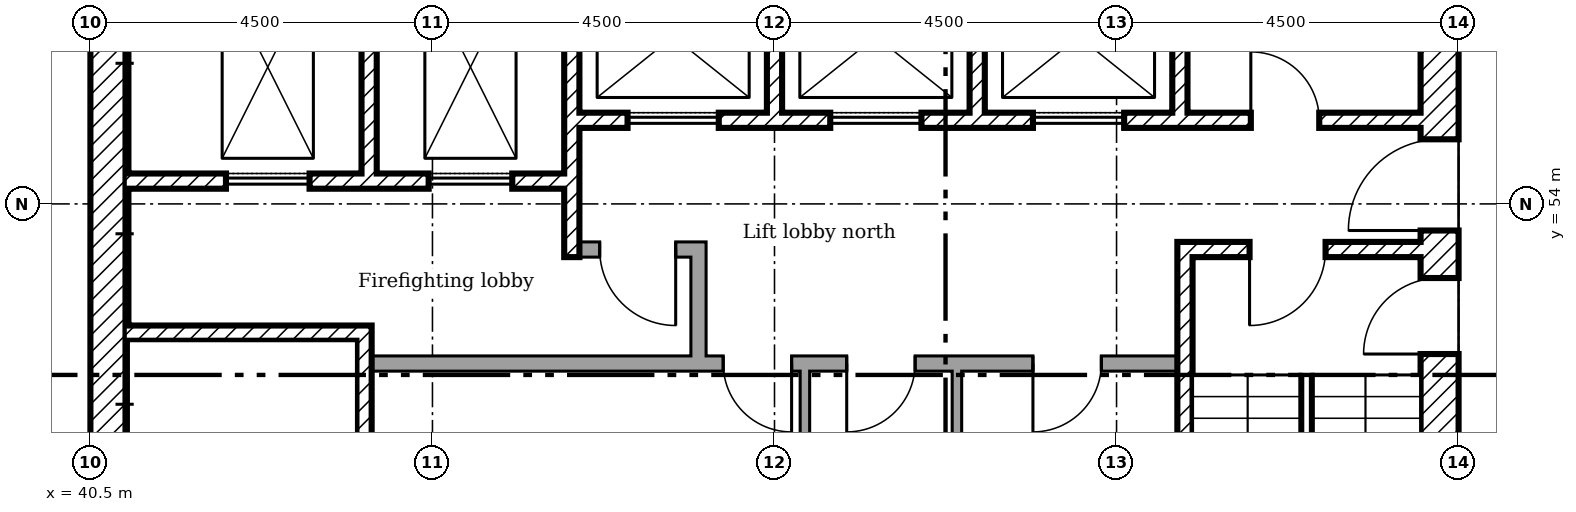
"""IFC4 building model, lengths in metres.
Left out: names, types, materials, properties, quantities, classifications, styles, units other than length and angle.
Written with IfcOpenShell. Run it as: python <this file> out.ifc"""

import sys

from ifc_helpers import new_model, si_unit, direction, frame, frame_2d, origin, place, context, subcontext, project, spatial, rectangle, extrude, element, fill, save


model = new_model("IFC4")
c1 = context("Model", 3, precision=1e-05, world=origin(), true_north=direction((0.0, 1.0)))
c2 = subcontext(c1, "Body", "Model", "MODEL_VIEW")
j1 = project(units=[si_unit("LENGTHUNIT", "METRE"), si_unit("PLANEANGLEUNIT", "RADIAN")], contexts=[c1])
p1 = place(None, origin())
s1 = spatial("IfcSite", under=j1, at=p1, CompositionType="ELEMENT")
p2 = place(p1, origin())
s2 = spatial("IfcBuilding", under=s1, at=p2, CompositionType="ELEMENT")
p3 = place(p2, frame((0.0, 0.0, 238.8)))
s3 = spatial("IfcBuildingStorey", under=s2, at=p3, CompositionType="ELEMENT", Elevation=238.8)
p4 = place(p3, frame((58.25, 40.5, 0.0), z_axis=(0.0, 0.0, 1.0), x_axis=(0.0, 1.0, 0.0)))
e1 = element("IfcWall", 1, at=p4, inside=s3, PredefinedType="SHEAR", context=c2, shape_type="SweptSolid", body=[
    extrude(rectangle(XDim=18.0, YDim=0.5, at=frame_2d((9.0, 0.0))), origin(), (0.0, 0.0, 1.0), 3.35),
])
p5 = place(p4, frame((13.15, 0.0, 0.0)))
e2 = element("IfcOpeningElement", 2, at=p5, cuts=e1, PredefinedType="OPENING", context=c2, shape_type="SweptSolid", body=[
    extrude(rectangle(XDim=1.2, YDim=2.1, at=frame_2d((0.6, 1.05))), frame((0.0, 0.26, 0.0), z_axis=(0.0, -1.0, 0.0), x_axis=(1.0, 0.0, 0.0)), (0.0, 0.0, 1.0), 0.52),
])
p6 = place(p4, frame((3.9, 0.0, 0.0)))
e3 = element("IfcOpeningElement", 3, at=p6, cuts=e1, PredefinedType="OPENING", context=c2, shape_type="SweptSolid", body=[
    extrude(rectangle(XDim=1.8, YDim=2.1, at=frame_2d((0.9, 1.05))), frame((0.0, 0.26, 0.0), z_axis=(0.0, -1.0, 0.0), x_axis=(1.0, 0.0, 0.0)), (0.0, 0.0, 1.0), 0.52),
])
p7 = place(p4, frame((11.525, 0.0, 0.0)))
e4 = element("IfcOpeningElement", 4, at=p7, cuts=e1, PredefinedType="OPENING", context=c2, shape_type="SweptSolid", body=[
    extrude(rectangle(XDim=1.0, YDim=2.1, at=frame_2d((0.5, 1.05))), frame((0.0, 0.26, 0.0), z_axis=(0.0, -1.0, 0.0), x_axis=(1.0, 0.0, 0.0)), (0.0, 0.0, 1.0), 0.52),
])
p8 = place(p3, frame((40.75, 41.0, 0.0), z_axis=(0.0, 0.0, 1.0), x_axis=(0.0, 1.0, 0.0)))
e5 = element("IfcWall", 5, at=p8, inside=s3, PredefinedType="SHEAR", context=c2, shape_type="SweptSolid", body=[
    extrude(rectangle(XDim=17.0, YDim=0.5, at=frame_2d((8.5, 0.0))), origin(), (0.0, 0.0, 1.0), 3.35),
])
p9 = place(p3, frame((44.167, 58.0, 0.0), z_axis=(0.0, 0.0, 1.0), x_axis=(0.0, -1.0, 0.0)))
e6 = element("IfcWall", 6, at=p9, inside=s3, PredefinedType="SHEAR", context=c2, shape_type="SweptSolid", body=[
    extrude(rectangle(XDim=3.6, YDim=0.2, at=frame_2d((1.8, 0.0))), origin(), (0.0, 0.0, 1.0), 3.35),
])
p10 = place(p3, frame((46.833, 58.0, 0.0), z_axis=(0.0, 0.0, 1.0), x_axis=(0.0, -1.0, 0.0)))
e7 = element("IfcWall", 7, at=p10, inside=s3, PredefinedType="SHEAR", context=c2, shape_type="SweptSolid", body=[
    extrude(rectangle(XDim=4.7, YDim=0.2, at=frame_2d((2.35, 0.0))), origin(), (0.0, 0.0, 1.0), 3.35),
])
for number, where, z_axis, x_axis in (
    (8, (49.5, 58.0, 0.0), (0.0, 0.0, 1.0), (0.0, -1.0, 0.0)),
    (9, (52.167, 58.0, 0.0), (0.0, 0.0, 1.0), (0.0, -1.0, 0.0)),
    (10, (54.833, 58.0, 0.0), (0.0, 0.0, 1.0), (0.0, -1.0, 0.0)),
):
    element("IfcWall", number, at=place(p3, frame(where, z_axis=z_axis, x_axis=x_axis)), inside=s3, PredefinedType="SHEAR", context=c2, shape_type="SweptSolid", body=[
        extrude(rectangle(XDim=2.8, YDim=0.2, at=frame_2d((1.4, 0.0))), origin(), (0.0, 0.0, 1.0), 3.35),
    ])
p11 = place(p3, frame((48.5, 51.9, 0.0), z_axis=(0.0, 0.0, 1.0), x_axis=(0.0, 1.0, 0.0)))
e11 = element("IfcWall", 11, at=p11, inside=s3, PredefinedType="PARTITIONING", context=c2, shape_type="SweptSolid", body=[
    extrude(rectangle(XDim=1.6, YDim=0.2, at=frame_2d((0.8, 0.0))), origin(), (0.0, 0.0, 1.0), 3.35),
])
p12 = place(p3, frame((46.933, 53.4, 0.0)))
e12 = element("IfcWall", 12, at=p12, inside=s3, PredefinedType="PARTITIONING", context=c2, shape_type="SweptSolid", body=[
    extrude(rectangle(XDim=1.467, YDim=0.2, at=frame_2d((0.733, 0.0))), origin(), (0.0, 0.0, 1.0), 3.35),
])
p13 = place(p12, frame((0.267, 0.0, 0.0)))
e13 = element("IfcOpeningElement", 13, at=p13, cuts=e12, PredefinedType="OPENING", context=c2, shape_type="SweptSolid", body=[
    extrude(rectangle(XDim=1.0, YDim=2.1, at=frame_2d((0.5, 1.05))), frame((0.0, 0.11, 0.0), z_axis=(0.0, -1.0, 0.0), x_axis=(1.0, 0.0, 0.0)), (0.0, 0.0, 1.0), 0.22),
])
p14 = place(p3, frame((46.933, 55.1, 0.0)))
e14 = element("IfcWall", 14, at=p14, inside=s3, PredefinedType="SHEAR", context=c2, shape_type="SweptSolid", body=[
    extrude(rectangle(XDim=11.067, YDim=0.2, at=frame_2d((5.533, 0.0))), origin(), (0.0, 0.0, 1.0), 3.35),
])
p15 = place(p14, frame((8.833, 0.0, 0.0)))
e15 = element("IfcOpeningElement", 15, at=p15, cuts=e14, PredefinedType="OPENING", context=c2, shape_type="SweptSolid", body=[
    extrude(rectangle(XDim=0.9, YDim=2.1, at=frame_2d((0.45, 1.05))), frame((0.0, 0.11, 0.0), z_axis=(0.0, -1.0, 0.0), x_axis=(1.0, 0.0, 0.0)), (0.0, 0.0, 1.0), 0.22),
])
p16 = place(p14, frame((0.633, 0.0, 0.0)))
e16 = element("IfcOpeningElement", 16, at=p16, cuts=e14, PredefinedType="OPENING", context=c2, shape_type="SweptSolid", body=[
    extrude(rectangle(XDim=1.2, YDim=2.1, at=frame_2d((0.6, 1.05))), frame((0.0, 0.11, 0.0), z_axis=(0.0, -1.0, 0.0), x_axis=(1.0, 0.0, 0.0)), (0.0, 0.0, 1.0), 0.22),
])
p17 = place(p14, frame((3.3, 0.0, 0.0)))
e17 = element("IfcOpeningElement", 17, at=p17, cuts=e14, PredefinedType="OPENING", context=c2, shape_type="SweptSolid", body=[
    extrude(rectangle(XDim=1.2, YDim=2.1, at=frame_2d((0.6, 1.05))), frame((0.0, 0.11, 0.0), z_axis=(0.0, -1.0, 0.0), x_axis=(1.0, 0.0, 0.0)), (0.0, 0.0, 1.0), 0.22),
])
p18 = place(p14, frame((5.967, 0.0, 0.0)))
e18 = element("IfcOpeningElement", 18, at=p18, cuts=e14, PredefinedType="OPENING", context=c2, shape_type="SweptSolid", body=[
    extrude(rectangle(XDim=1.2, YDim=2.1, at=frame_2d((0.6, 1.05))), frame((0.0, 0.11, 0.0), z_axis=(0.0, -1.0, 0.0), x_axis=(1.0, 0.0, 0.0)), (0.0, 0.0, 1.0), 0.22),
])
p19 = place(p3, frame((41.0, 54.3, 0.0)))
e19 = element("IfcWall", 19, at=p19, inside=s3, PredefinedType="SHEAR", context=c2, shape_type="SweptSolid", body=[
    extrude(rectangle(XDim=5.733, YDim=0.2, at=frame_2d((2.867, 0.0))), origin(), (0.0, 0.0, 1.0), 3.35),
])
p20 = place(p19, frame((1.283, 0.0, 0.0)))
e20 = element("IfcOpeningElement", 20, at=p20, cuts=e19, PredefinedType="OPENING", context=c2, shape_type="SweptSolid", body=[
    extrude(rectangle(XDim=1.1, YDim=2.1, at=frame_2d((0.55, 1.05))), frame((0.0, 0.11, 0.0), z_axis=(0.0, -1.0, 0.0), x_axis=(1.0, 0.0, 0.0)), (0.0, 0.0, 1.0), 0.22),
])
p21 = place(p19, frame((3.95, 0.0, 0.0)))
e21 = element("IfcOpeningElement", 21, at=p21, cuts=e19, PredefinedType="OPENING", context=c2, shape_type="SweptSolid", body=[
    extrude(rectangle(XDim=1.1, YDim=2.1, at=frame_2d((0.55, 1.05))), frame((0.0, 0.11, 0.0), z_axis=(0.0, -1.0, 0.0), x_axis=(1.0, 0.0, 0.0)), (0.0, 0.0, 1.0), 0.22),
])
p22 = place(p3, frame((44.1, 45.5, 0.0), z_axis=(0.0, 0.0, 1.0), x_axis=(0.0, 1.0, 0.0)))
e22 = element("IfcWall", 22, at=p22, inside=s3, PredefinedType="SHEAR", context=c2, shape_type="SweptSolid", body=[
    extrude(rectangle(XDim=6.9, YDim=0.2, at=frame_2d((3.45, 0.0))), origin(), (0.0, 0.0, 1.0), 3.35),
])
p23 = place(p3, frame((41.0, 52.3, 0.0)))
e23 = element("IfcWall", 23, at=p23, inside=s3, PredefinedType="SHEAR", context=c2, shape_type="SweptSolid", body=[
    extrude(rectangle(XDim=3.0, YDim=0.2, at=frame_2d((1.5, 0.0))), origin(), (0.0, 0.0, 1.0), 3.35),
])
p24 = place(p3, frame((54.8, 53.4, 0.0)))
e24 = element("IfcWall", 24, at=p24, inside=s3, PredefinedType="SHEAR", context=c2, shape_type="SweptSolid", body=[
    extrude(rectangle(XDim=3.2, YDim=0.2, at=frame_2d((1.6, 0.0))), origin(), (0.0, 0.0, 1.0), 3.35),
])
p25 = place(p24, frame((0.95, 0.0, 0.0)))
e25 = element("IfcOpeningElement", 25, at=p25, cuts=e24, PredefinedType="OPENING", context=c2, shape_type="SweptSolid", body=[
    extrude(rectangle(XDim=1.0, YDim=2.1, at=frame_2d((0.5, 1.05))), frame((0.0, 0.11, 0.0), z_axis=(0.0, -1.0, 0.0), x_axis=(1.0, 0.0, 0.0)), (0.0, 0.0, 1.0), 0.22),
])
p26 = place(p3, frame((54.9, 46.8, 0.0), z_axis=(0.0, 0.0, 1.0), x_axis=(0.0, 1.0, 0.0)))
e26 = element("IfcWall", 26, at=p26, inside=s3, PredefinedType="SHEAR", context=c2, shape_type="SweptSolid", body=[
    extrude(rectangle(XDim=6.5, YDim=0.2, at=frame_2d((3.25, 0.0))), origin(), (0.0, 0.0, 1.0), 3.35),
])
p27 = place(p3, frame((44.2, 51.9, 0.0)))
e27 = element("IfcWall", 27, at=p27, inside=s3, PredefinedType="PARTITIONING", context=c2, shape_type="SweptSolid", body=[
    extrude(rectangle(XDim=10.6, YDim=0.2, at=frame_2d((5.3, 0.0))), origin(), (0.0, 0.0, 1.0), 3.35),
])
p28 = place(p27, frame((4.625, 0.0, 0.0)))
e28 = element("IfcOpeningElement", 28, at=p28, cuts=e27, PredefinedType="OPENING", context=c2, shape_type="SweptSolid", body=[
    extrude(rectangle(XDim=0.9, YDim=2.1, at=frame_2d((0.45, 1.05))), frame((0.0, 0.11, 0.0), z_axis=(0.0, -1.0, 0.0), x_axis=(1.0, 0.0, 0.0)), (0.0, 0.0, 1.0), 0.22),
])
p29 = place(p27, frame((6.25, 0.0, 0.0)))
e29 = element("IfcOpeningElement", 29, at=p29, cuts=e27, PredefinedType="OPENING", context=c2, shape_type="SweptSolid", body=[
    extrude(rectangle(XDim=0.9, YDim=2.1, at=frame_2d((0.45, 1.05))), frame((0.0, 0.11, 0.0), z_axis=(0.0, -1.0, 0.0), x_axis=(1.0, 0.0, 0.0)), (0.0, 0.0, 1.0), 0.22),
])
p30 = place(p27, frame((8.7, 0.0, 0.0)))
e30 = element("IfcOpeningElement", 30, at=p30, cuts=e27, PredefinedType="OPENING", context=c2, shape_type="SweptSolid", body=[
    extrude(rectangle(XDim=0.9, YDim=2.1, at=frame_2d((0.45, 1.05))), frame((0.0, 0.11, 0.0), z_axis=(0.0, -1.0, 0.0), x_axis=(1.0, 0.0, 0.0)), (0.0, 0.0, 1.0), 0.22),
])
for number, where, z_axis, x_axis in (
    (31, (49.9, 48.163, 0.0), (0.0, 0.0, 1.0), (0.0, 1.0, 0.0)),
    (32, (51.9, 48.163, 0.0), (0.0, 0.0, 1.0), (0.0, 1.0, 0.0)),
):
    element("IfcWall", number, at=place(p3, frame(where, z_axis=z_axis, x_axis=x_axis)), inside=s3, PredefinedType="PARTITIONING", context=c2, shape_type="SweptSolid", body=[
        extrude(rectangle(XDim=3.637, YDim=0.125, at=frame_2d((1.819, 0.0))), origin(), (0.0, 0.0, 1.0), 3.35),
    ])
p31 = place(p5, origin())
e33 = element("IfcDoor", 33, at=p31, inside=s3, OperationType="SINGLE_SWING_RIGHT", PredefinedType="DOOR", context=c2, shape_type="SweptSolid", body=[
    extrude(rectangle(XDim=1.2, YDim=2.1, at=frame_2d((0.6, 1.05))), frame((0.0, 0.025, 0.0), z_axis=(0.0, -1.0, 0.0), x_axis=(1.0, 0.0, 0.0)), (0.0, 0.0, 1.0), 0.05),
])
fill(e2, e33)
p32 = place(p25, frame((1.0, 0.0, 0.0), x_axis=(-1.0, 0.0, 0.0)))
e34 = element("IfcDoor", 34, at=p32, inside=s3, OperationType="SINGLE_SWING_LEFT", PredefinedType="DOOR", context=c2, shape_type="SweptSolid", body=[
    extrude(rectangle(XDim=1.0, YDim=2.1, at=frame_2d((0.5, 1.05))), frame((0.0, 0.025, 0.0), z_axis=(0.0, -1.0, 0.0), x_axis=(1.0, 0.0, 0.0)), (0.0, 0.0, 1.0), 0.05),
])
fill(e25, e34)
p33 = place(p7, origin())
e35 = element("IfcDoor", 35, at=p33, inside=s3, OperationType="SINGLE_SWING_RIGHT", PredefinedType="DOOR", context=c2, shape_type="SweptSolid", body=[
    extrude(rectangle(XDim=1.0, YDim=2.1, at=frame_2d((0.5, 1.05))), frame((0.0, 0.025, 0.0), z_axis=(0.0, -1.0, 0.0), x_axis=(1.0, 0.0, 0.0)), (0.0, 0.0, 1.0), 0.05),
])
fill(e4, e35)
p34 = place(p13, frame((1.0, 0.0, 0.0), x_axis=(-1.0, 0.0, 0.0)))
e36 = element("IfcDoor", 36, at=p34, inside=s3, OperationType="SINGLE_SWING_RIGHT", PredefinedType="DOOR", context=c2, shape_type="SweptSolid", body=[
    extrude(rectangle(XDim=1.0, YDim=2.1, at=frame_2d((0.5, 1.05))), frame((0.0, 0.025, 0.0), z_axis=(0.0, -1.0, 0.0), x_axis=(1.0, 0.0, 0.0)), (0.0, 0.0, 1.0), 0.05),
])
fill(e13, e36)
p35 = place(p15, origin())
e37 = element("IfcDoor", 37, at=p35, inside=s3, OperationType="SINGLE_SWING_RIGHT", PredefinedType="DOOR", context=c2, shape_type="SweptSolid", body=[
    extrude(rectangle(XDim=0.9, YDim=2.1, at=frame_2d((0.45, 1.05))), frame((0.0, 0.025, 0.0), z_axis=(0.0, -1.0, 0.0), x_axis=(1.0, 0.0, 0.0)), (0.0, 0.0, 1.0), 0.05),
])
fill(e15, e37)
p36 = place(p28, frame((0.9, 0.0, 0.0), x_axis=(-1.0, 0.0, 0.0)))
e38 = element("IfcDoor", 38, at=p36, inside=s3, OperationType="SINGLE_SWING_RIGHT", PredefinedType="DOOR", context=c2, shape_type="SweptSolid", body=[
    extrude(rectangle(XDim=0.9, YDim=2.1, at=frame_2d((0.45, 1.05))), frame((0.0, 0.025, 0.0), z_axis=(0.0, -1.0, 0.0), x_axis=(1.0, 0.0, 0.0)), (0.0, 0.0, 1.0), 0.05),
])
fill(e28, e38)
p37 = place(p29, frame((0.9, 0.0, 0.0), x_axis=(-1.0, 0.0, 0.0)))
e39 = element("IfcDoor", 39, at=p37, inside=s3, OperationType="SINGLE_SWING_LEFT", PredefinedType="DOOR", context=c2, shape_type="SweptSolid", body=[
    extrude(rectangle(XDim=0.9, YDim=2.1, at=frame_2d((0.45, 1.05))), frame((0.0, 0.025, 0.0), z_axis=(0.0, -1.0, 0.0), x_axis=(1.0, 0.0, 0.0)), (0.0, 0.0, 1.0), 0.05),
])
fill(e29, e39)
p38 = place(p30, frame((0.9, 0.0, 0.0), x_axis=(-1.0, 0.0, 0.0)))
e40 = element("IfcDoor", 40, at=p38, inside=s3, OperationType="SINGLE_SWING_LEFT", PredefinedType="DOOR", context=c2, shape_type="SweptSolid", body=[
    extrude(rectangle(XDim=0.9, YDim=2.1, at=frame_2d((0.45, 1.05))), frame((0.0, 0.025, 0.0), z_axis=(0.0, -1.0, 0.0), x_axis=(1.0, 0.0, 0.0)), (0.0, 0.0, 1.0), 0.05),
])
fill(e30, e40)
p39 = place(p20, origin())
e41 = element("IfcDoor", 41, at=p39, inside=s3, OperationType="SLIDING_TO_LEFT", PredefinedType="DOOR", context=c2, shape_type="SweptSolid", body=[
    extrude(rectangle(XDim=1.1, YDim=2.1, at=frame_2d((0.55, 1.05))), frame((0.0, 0.025, 0.0), z_axis=(0.0, -1.0, 0.0), x_axis=(1.0, 0.0, 0.0)), (0.0, 0.0, 1.0), 0.05),
])
fill(e20, e41)
p40 = place(p21, origin())
e42 = element("IfcDoor", 42, at=p40, inside=s3, OperationType="SLIDING_TO_LEFT", PredefinedType="DOOR", context=c2, shape_type="SweptSolid", body=[
    extrude(rectangle(XDim=1.1, YDim=2.1, at=frame_2d((0.55, 1.05))), frame((0.0, 0.025, 0.0), z_axis=(0.0, -1.0, 0.0), x_axis=(1.0, 0.0, 0.0)), (0.0, 0.0, 1.0), 0.05),
])
fill(e21, e42)
p41 = place(p16, origin())
e43 = element("IfcDoor", 43, at=p41, inside=s3, OperationType="SLIDING_TO_LEFT", PredefinedType="DOOR", context=c2, shape_type="SweptSolid", body=[
    extrude(rectangle(XDim=1.2, YDim=2.1, at=frame_2d((0.6, 1.05))), frame((0.0, 0.025, 0.0), z_axis=(0.0, -1.0, 0.0), x_axis=(1.0, 0.0, 0.0)), (0.0, 0.0, 1.0), 0.05),
])
fill(e16, e43)
p42 = place(p17, origin())
e44 = element("IfcDoor", 44, at=p42, inside=s3, OperationType="SLIDING_TO_LEFT", PredefinedType="DOOR", context=c2, shape_type="SweptSolid", body=[
    extrude(rectangle(XDim=1.2, YDim=2.1, at=frame_2d((0.6, 1.05))), frame((0.0, 0.025, 0.0), z_axis=(0.0, -1.0, 0.0), x_axis=(1.0, 0.0, 0.0)), (0.0, 0.0, 1.0), 0.05),
])
fill(e17, e44)
p43 = place(p18, origin())
e45 = element("IfcDoor", 45, at=p43, inside=s3, OperationType="SLIDING_TO_LEFT", PredefinedType="DOOR", context=c2, shape_type="SweptSolid", body=[
    extrude(rectangle(XDim=1.2, YDim=2.1, at=frame_2d((0.6, 1.05))), frame((0.0, 0.025, 0.0), z_axis=(0.0, -1.0, 0.0), x_axis=(1.0, 0.0, 0.0)), (0.0, 0.0, 1.0), 0.05),
])
fill(e18, e45)
save(model, sys.argv[1])
